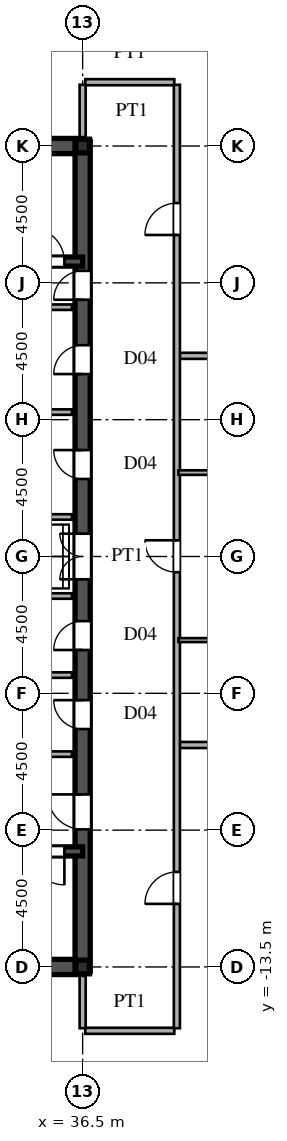
"""IFC4 building model, lengths in metres.
Left out: names, types, materials, properties, quantities, classifications, styles, units other than length and angle.
Written with IfcOpenShell. Run it as: python <this file> out.ifc"""

import sys

from ifc_helpers import new_model, si_unit, direction, frame, frame_2d, origin, origin_2d, place, context, subcontext, project, spatial, rectangle, i_section, extrude, source, transform, mapped, element, fill, save


model = new_model("IFC4")
c1 = context("Model", 3, precision=1e-05, world=origin(), true_north=direction((0.0, 1.0)))
c2 = subcontext(c1, "Body", "Model", "MODEL_VIEW")
j1 = project(units=[si_unit("LENGTHUNIT", "METRE"), si_unit("PLANEANGLEUNIT", "RADIAN")], contexts=[c1])
p1 = place(None, origin())
s1 = spatial("IfcSite", under=j1, at=p1, CompositionType="ELEMENT")
p2 = place(p1, origin())
s2 = spatial("IfcBuilding", under=s1, at=p2, CompositionType="ELEMENT")
p3 = place(p2, frame((0.0, 0.0, 239.4)))
s3 = spatial("IfcBuildingStorey", under=s2, at=p3, CompositionType="ELEMENT", Elevation=239.4)
m1 = source(origin(), c2, "Body", "SweptSolid", [
    extrude(i_section(OverallWidth=0.45, OverallDepth=0.45, WebThickness=0.016, FlangeThickness=0.025, at=origin_2d()), origin(), (0.0, 0.0, 1.0), 3.75),
])
for number, where, z_axis, x_axis in (
    (1, (36.5, -13.5, 0.0), (0.0, 0.0, 1.0), (1.0, 0.0, 0.0)),
    (2, (36.5, 13.5, 0.0), (0.0, 0.0, 1.0), (1.0, 0.0, 0.0)),
):
    element("IfcColumn", number, at=place(p3, frame(where, z_axis=z_axis, x_axis=x_axis)), inside=s3, PredefinedType="COLUMN", context=c2, shape_type="MappedRepresentation", body=[
        mapped(m1, transform((0.0, 0.0, 0.0), scale=1.0)),
    ])
for number, where, z_axis, x_axis in (
    (3, (27.5, -13.5, 0.0), (0.0, 0.0, 1.0), (1.0, 0.0, 0.0)),
    (4, (27.5, 13.5, 0.0), (0.0, 0.0, 1.0), (1.0, 0.0, 0.0)),
):
    element("IfcWall", number, at=place(p3, frame(where, z_axis=z_axis, x_axis=x_axis)), inside=s3, PredefinedType="SHEAR", context=c2, shape_type="SweptSolid", body=[
        extrude(rectangle(XDim=9.0, YDim=0.5, at=frame_2d((4.5, 0.0))), origin(), (0.0, 0.0, 1.0), 3.53),
    ])
p4 = place(p3, frame((36.5, -13.65, 0.0), z_axis=(0.0, 0.0, 1.0), x_axis=(0.0, 1.0, 0.0)))
e5 = element("IfcWall", 5, at=p4, inside=s3, PredefinedType="SHEAR", context=c2, shape_type="SweptSolid", body=[
    extrude(rectangle(XDim=7.15, YDim=0.5, at=frame_2d((3.575, 0.0))), origin(), (0.0, 0.0, 1.0), 3.53),
])
p5 = place(p4, frame((4.675, 0.0, 0.0)))
e6 = element("IfcOpeningElement", 6, at=p5, cuts=e5, PredefinedType="OPENING", context=c2, shape_type="SweptSolid", body=[
    extrude(rectangle(XDim=1.15, YDim=2.2, at=frame_2d((0.575, 1.1))), frame((0.0, 0.26, 0.0), z_axis=(0.0, -1.0, 0.0), x_axis=(1.0, 0.0, 0.0)), (0.0, 0.0, 1.0), 0.52),
])
p6 = place(p3, frame((36.5, -1.3, 0.0), z_axis=(0.0, 0.0, 1.0), x_axis=(0.0, 1.0, 0.0)))
e7 = element("IfcWall", 7, at=p6, inside=s3, PredefinedType="SHEAR", context=c2, shape_type="SweptSolid", body=[
    extrude(rectangle(XDim=2.6, YDim=0.5, at=frame_2d((1.3, 0.0))), origin(), (0.0, 0.0, 1.0), 3.53),
])
p7 = place(p6, frame((0.55, 0.0, 0.0)))
e8 = element("IfcOpeningElement", 8, at=p7, cuts=e7, PredefinedType="OPENING", context=c2, shape_type="SweptSolid", body=[
    extrude(rectangle(XDim=1.5, YDim=2.3, at=frame_2d((0.75, 1.15))), frame((0.0, 0.26, 0.0), z_axis=(0.0, -1.0, 0.0), x_axis=(1.0, 0.0, 0.0)), (0.0, 0.0, 1.0), 0.52),
])
p8 = place(p3, frame((36.5, 8.2, 0.0), z_axis=(0.0, 0.0, 1.0), x_axis=(0.0, 1.0, 0.0)))
e9 = element("IfcWall", 9, at=p8, inside=s3, PredefinedType="SHEAR", context=c2, shape_type="SweptSolid", body=[
    extrude(rectangle(XDim=5.45, YDim=0.5, at=frame_2d((2.725, 0.0))), origin(), (0.0, 0.0, 1.0), 3.53),
])
p9 = place(p8, frame((0.245, 0.0, 0.0)))
e10 = element("IfcOpeningElement", 10, at=p9, cuts=e9, PredefinedType="OPENING", context=c2, shape_type="SweptSolid", body=[
    extrude(rectangle(XDim=0.95, YDim=2.15, at=frame_2d((0.475, 1.075))), frame((0.0, 0.26, 0.0), z_axis=(0.0, -1.0, 0.0), x_axis=(1.0, 0.0, 0.0)), (0.0, 0.0, 1.0), 0.52),
])
p10 = place(p3, frame((36.5, -6.5, 0.0), z_axis=(0.0, 0.0, 1.0), x_axis=(0.0, 1.0, 0.0)))
e11 = element("IfcWall", 11, at=p10, inside=s3, PredefinedType="SHEAR", context=c2, shape_type="SweptSolid", body=[
    extrude(rectangle(XDim=2.6, YDim=0.5, at=frame_2d((1.3, 0.0))), origin(), (0.0, 0.0, 1.0), 3.53),
])
p11 = place(p10, frame((0.825, 0.0, 0.0)))
e12 = element("IfcOpeningElement", 12, at=p11, cuts=e11, PredefinedType="OPENING", context=c2, shape_type="SweptSolid", body=[
    extrude(rectangle(XDim=0.95, YDim=2.15, at=frame_2d((0.475, 1.075))), frame((0.0, 0.26, 0.0), z_axis=(0.0, -1.0, 0.0), x_axis=(1.0, 0.0, 0.0)), (0.0, 0.0, 1.0), 0.52),
])
p12 = place(p3, frame((36.5, -3.9, 0.0), z_axis=(0.0, 0.0, 1.0), x_axis=(0.0, 1.0, 0.0)))
e13 = element("IfcWall", 13, at=p12, inside=s3, PredefinedType="SHEAR", context=c2, shape_type="SweptSolid", body=[
    extrude(rectangle(XDim=2.6, YDim=0.5, at=frame_2d((1.3, 0.0))), origin(), (0.0, 0.0, 1.0), 3.53),
])
p13 = place(p12, frame((0.825, 0.0, 0.0)))
e14 = element("IfcOpeningElement", 14, at=p13, cuts=e13, PredefinedType="OPENING", context=c2, shape_type="SweptSolid", body=[
    extrude(rectangle(XDim=0.95, YDim=2.15, at=frame_2d((0.475, 1.075))), frame((0.0, 0.26, 0.0), z_axis=(0.0, -1.0, 0.0), x_axis=(1.0, 0.0, 0.0)), (0.0, 0.0, 1.0), 0.52),
])
p14 = place(p3, frame((36.5, 1.3, 0.0), z_axis=(0.0, 0.0, 1.0), x_axis=(0.0, 1.0, 0.0)))
e15 = element("IfcWall", 15, at=p14, inside=s3, PredefinedType="SHEAR", context=c2, shape_type="SweptSolid", body=[
    extrude(rectangle(XDim=3.45, YDim=0.5, at=frame_2d((1.725, 0.0))), origin(), (0.0, 0.0, 1.0), 3.53),
])
p15 = place(p14, frame((1.25, 0.0, 0.0)))
e16 = element("IfcOpeningElement", 16, at=p15, cuts=e15, PredefinedType="OPENING", context=c2, shape_type="SweptSolid", body=[
    extrude(rectangle(XDim=0.95, YDim=2.15, at=frame_2d((0.475, 1.075))), frame((0.0, 0.26, 0.0), z_axis=(0.0, -1.0, 0.0), x_axis=(1.0, 0.0, 0.0)), (0.0, 0.0, 1.0), 0.52),
])
p16 = place(p3, frame((36.5, 4.75, 0.0), z_axis=(0.0, 0.0, 1.0), x_axis=(0.0, 1.0, 0.0)))
e17 = element("IfcWall", 17, at=p16, inside=s3, PredefinedType="SHEAR", context=c2, shape_type="SweptSolid", body=[
    extrude(rectangle(XDim=3.45, YDim=0.5, at=frame_2d((1.725, 0.0))), origin(), (0.0, 0.0, 1.0), 3.53),
])
p17 = place(p16, frame((1.25, 0.0, 0.0)))
e18 = element("IfcOpeningElement", 18, at=p17, cuts=e17, PredefinedType="OPENING", context=c2, shape_type="SweptSolid", body=[
    extrude(rectangle(XDim=0.95, YDim=2.15, at=frame_2d((0.475, 1.075))), frame((0.0, 0.26, 0.0), z_axis=(0.0, -1.0, 0.0), x_axis=(1.0, 0.0, 0.0)), (0.0, 0.0, 1.0), 0.52),
])
p18 = place(p3, frame((27.5, -9.7, 0.0), z_axis=(0.0, 0.0, 1.0), x_axis=(1.0, 0.0, 0.0)))
e19 = element("IfcWall", 19, at=p18, inside=s3, PredefinedType="SHEAR", context=c2, shape_type="SweptSolid", body=[
    extrude(rectangle(XDim=9.0, YDim=0.3, at=frame_2d((4.5, 0.0))), origin(), (0.0, 0.0, 1.0), 3.53),
])
p19 = place(p18, frame((7.3, 0.0, 0.0)))
e20 = element("IfcOpeningElement", 20, at=p19, cuts=e19, PredefinedType="OPENING", context=c2, shape_type="SweptSolid", body=[
    extrude(rectangle(XDim=1.1, YDim=2.2, at=frame_2d((0.55, 1.1))), frame((0.0, 0.16, 0.0), z_axis=(0.0, -1.0, 0.0), x_axis=(1.0, 0.0, 0.0)), (0.0, 0.0, 1.0), 0.32),
])
p20 = place(p3, frame((27.5, 9.7, 0.0), z_axis=(0.0, 0.0, 1.0), x_axis=(1.0, 0.0, 0.0)))
e21 = element("IfcWall", 21, at=p20, inside=s3, PredefinedType="SHEAR", context=c2, shape_type="SweptSolid", body=[
    extrude(rectangle(XDim=9.0, YDim=0.3, at=frame_2d((4.5, 0.0))), origin(), (0.0, 0.0, 1.0), 3.53),
])
p21 = place(p20, frame((7.3, 0.0, 0.0)))
e22 = element("IfcOpeningElement", 22, at=p21, cuts=e21, PredefinedType="OPENING", context=c2, shape_type="SweptSolid", body=[
    extrude(rectangle(XDim=1.1, YDim=2.2, at=frame_2d((0.55, 1.1))), frame((0.0, 0.16, 0.0), z_axis=(0.0, -1.0, 0.0), x_axis=(1.0, 0.0, 0.0)), (0.0, 0.0, 1.0), 0.32),
])
for number, where, z_axis, x_axis in (
    (23, (30.45, -6.5, 0.0), (0.0, 0.0, 1.0), (1.0, 0.0, 0.0)),
    (24, (30.45, 8.2, 0.0), (0.0, 0.0, 1.0), (1.0, 0.0, 0.0)),
):
    element("IfcWall", number, at=place(p3, frame(where, z_axis=z_axis, x_axis=x_axis)), inside=s3, PredefinedType="PARTITIONING", context=c2, shape_type="SweptSolid", body=[
        extrude(rectangle(XDim=5.7, YDim=0.18, at=frame_2d((2.85, 0.0))), origin(), (0.0, 0.0, 1.0), 3.53),
    ])
for number, where, z_axis, x_axis in (
    (25, (33.2, -1.3, 0.0), (0.0, 0.0, 1.0), (1.0, 0.0, 0.0)),
    (26, (33.2, 1.3, 0.0), (0.0, 0.0, 1.0), (1.0, 0.0, 0.0)),
    (27, (33.2, -3.9, 0.0), (0.0, 0.0, 1.0), (1.0, 0.0, 0.0)),
    (28, (33.2, 4.75, 0.0), (0.0, 0.0, 1.0), (1.0, 0.0, 0.0)),
):
    element("IfcWall", number, at=place(p3, frame(where, z_axis=z_axis, x_axis=x_axis)), inside=s3, PredefinedType="PARTITIONING", context=c2, shape_type="SweptSolid", body=[
        extrude(rectangle(XDim=2.95, YDim=0.18, at=frame_2d((1.475, 0.0))), origin(), (0.0, 0.0, 1.0), 3.53),
    ])
p22 = place(p3, frame((36.585, -15.6, 0.0), z_axis=(0.0, 0.0, 1.0), x_axis=(1.0, 0.0, 0.0)))
e29 = element("IfcWall", 29, at=p22, inside=s3, PredefinedType="PARTITIONING", context=c2, shape_type="SweptSolid", body=[
    extrude(rectangle(XDim=2.93, YDim=0.2, at=frame_2d((1.465, 0.0))), origin(), (0.0, 0.0, 1.0), 3.53),
])
p23 = place(p3, frame((39.68, -6.2, 0.0), z_axis=(0.0, 0.0, 1.0), x_axis=(1.0, 0.0, 0.0)))
e30 = element("IfcWall", 30, at=p23, inside=s3, PredefinedType="PARTITIONING", context=c2, shape_type="SweptSolid", body=[
    extrude(rectangle(XDim=19.996, YDim=0.2, at=frame_2d((9.998, 0.0))), origin(), (0.0, 0.0, 1.0), 3.53),
])
p24 = place(p3, frame((39.65, -2.75, 0.0), z_axis=(0.0, 0.0, 1.0), x_axis=(1.0, 0.0, 0.0)))
e31 = element("IfcWall", 31, at=p24, inside=s3, PredefinedType="PARTITIONING", context=c2, shape_type="SweptSolid", body=[
    extrude(rectangle(XDim=4.4, YDim=0.13, at=frame_2d((2.2, 0.0))), origin(), (0.0, 0.0, 1.0), 3.53),
])
p25 = place(p24, frame((1.76, 0.0, 0.0)))
e32 = element("IfcOpeningElement", 32, at=p25, cuts=e31, PredefinedType="OPENING", context=c2, shape_type="SweptSolid", body=[
    extrude(rectangle(XDim=0.88, YDim=2.1, at=frame_2d((0.44, 1.05))), frame((0.0, 0.075, 0.0), z_axis=(0.0, -1.0, 0.0), x_axis=(1.0, 0.0, 0.0)), (0.0, 0.0, 1.0), 0.15),
])
p26 = place(p3, frame((39.65, 2.76, 0.0), z_axis=(0.0, 0.0, 1.0), x_axis=(1.0, 0.0, 0.0)))
e33 = element("IfcWall", 33, at=p26, inside=s3, PredefinedType="PARTITIONING", context=c2, shape_type="SweptSolid", body=[
    extrude(rectangle(XDim=4.4, YDim=0.15, at=frame_2d((2.2, 0.0))), origin(), (0.0, 0.0, 1.0), 3.53),
])
p27 = place(p26, frame((1.725, 0.0, 0.0)))
e34 = element("IfcOpeningElement", 34, at=p27, cuts=e33, PredefinedType="OPENING", context=c2, shape_type="SweptSolid", body=[
    extrude(rectangle(XDim=0.95, YDim=2.15, at=frame_2d((0.475, 1.075))), frame((0.0, 0.085, 0.0), z_axis=(0.0, -1.0, 0.0), x_axis=(1.0, 0.0, 0.0)), (0.0, 0.0, 1.0), 0.17),
])
p28 = place(p3, frame((39.68, 6.6, 0.0), z_axis=(0.0, 0.0, 1.0), x_axis=(1.0, 0.0, 0.0)))
e35 = element("IfcWall", 35, at=p28, inside=s3, PredefinedType="PARTITIONING", context=c2, shape_type="SweptSolid", body=[
    extrude(rectangle(XDim=19.33, YDim=0.2, at=frame_2d((9.665, 0.0))), origin(), (0.0, 0.0, 1.0), 3.53),
])
p29 = place(p3, frame((36.585, 15.6, 0.0), z_axis=(0.0, 0.0, 1.0), x_axis=(1.0, 0.0, 0.0)))
e36 = element("IfcWall", 36, at=p29, inside=s3, PredefinedType="PARTITIONING", context=c2, shape_type="SweptSolid", body=[
    extrude(rectangle(XDim=2.93, YDim=0.2, at=frame_2d((1.465, 0.0))), origin(), (0.0, 0.0, 1.0), 3.53),
])
for number, where, z_axis, x_axis in (
    (37, (36.5, -15.515, 0.0), (0.0, 0.0, 1.0), (0.0, 1.0, 0.0)),
    (38, (36.5, 13.755, 0.0), (0.0, 0.0, 1.0), (0.0, 1.0, 0.0)),
):
    element("IfcWall", number, at=place(p3, frame(where, z_axis=z_axis, x_axis=x_axis)), inside=s3, PredefinedType="PARTITIONING", context=c2, shape_type="SweptSolid", body=[
        extrude(rectangle(XDim=1.76, YDim=0.2, at=frame_2d((0.88, 0.0))), origin(), (0.0, 0.0, 1.0), 2.93),
    ])
p30 = place(p3, frame((39.6, -15.515, 0.0), z_axis=(0.0, 0.0, 1.0), x_axis=(0.0, 1.0, 0.0)))
e39 = element("IfcWall", 39, at=p30, inside=s3, PredefinedType="PARTITIONING", context=c2, shape_type="SweptSolid", body=[
    extrude(rectangle(XDim=31.03, YDim=0.2, at=frame_2d((15.515, 0.0))), origin(), (0.0, 0.0, 1.0), 3.53),
])
p31 = place(p30, frame((4.09, 0.0, 0.0)))
e40 = element("IfcOpeningElement", 40, at=p31, cuts=e39, PredefinedType="OPENING", context=c2, shape_type="SweptSolid", body=[
    extrude(rectangle(XDim=1.05, YDim=2.25, at=frame_2d((0.525, 1.125))), frame((0.0, 0.11, 0.0), z_axis=(0.0, -1.0, 0.0), x_axis=(1.0, 0.0, 0.0)), (0.0, 0.0, 1.0), 0.22),
])
p32 = place(p30, frame((14.998, 0.0, 0.0)))
e41 = element("IfcOpeningElement", 41, at=p32, cuts=e39, PredefinedType="OPENING", context=c2, shape_type="SweptSolid", body=[
    extrude(rectangle(XDim=1.05, YDim=2.25, at=frame_2d((0.525, 1.125))), frame((0.0, 0.11, 0.0), z_axis=(0.0, -1.0, 0.0), x_axis=(1.0, 0.0, 0.0)), (0.0, 0.0, 1.0), 0.22),
])
p33 = place(p30, frame((26.09, 0.0, 0.0)))
e42 = element("IfcOpeningElement", 42, at=p33, cuts=e39, PredefinedType="OPENING", context=c2, shape_type="SweptSolid", body=[
    extrude(rectangle(XDim=1.05, YDim=2.25, at=frame_2d((0.525, 1.125))), frame((0.0, 0.11, 0.0), z_axis=(0.0, -1.0, 0.0), x_axis=(1.0, 0.0, 0.0)), (0.0, 0.0, 1.0), 0.22),
])
m2 = source(origin(), c2, "Body", "SweptSolid", [
    extrude(rectangle(XDim=1.15, YDim=2.2, at=frame_2d((0.575, 1.1))), frame((0.0, 0.025, 0.0), z_axis=(0.0, -1.0, 0.0), x_axis=(1.0, 0.0, 0.0)), (0.0, 0.0, 1.0), 0.05),
])
p34 = place(p5, origin())
e43 = element("IfcDoor", 43, at=p34, inside=s3, OperationType="SINGLE_SWING_RIGHT", PredefinedType="DOOR", context=c2, shape_type="MappedRepresentation", body=[
    mapped(m2, transform((0.0, 0.0, 0.0), scale=1.0)),
])
fill(e6, e43)
m3 = source(origin(), c2, "Body", "SweptSolid", [
    extrude(rectangle(XDim=1.5, YDim=2.3, at=frame_2d((0.75, 1.15))), frame((0.0, 0.025, 0.0), z_axis=(0.0, -1.0, 0.0), x_axis=(1.0, 0.0, 0.0)), (0.0, 0.0, 1.0), 0.05),
])
p35 = place(p7, origin())
e44 = element("IfcDoor", 44, at=p35, inside=s3, OperationType="DOUBLE_SWING_LEFT", PredefinedType="DOOR", context=c2, shape_type="MappedRepresentation", body=[
    mapped(m3, transform((0.0, 0.0, 0.0), scale=1.0)),
])
fill(e8, e44)
m4 = source(origin(), c2, "Body", "SweptSolid", [
    extrude(rectangle(XDim=0.95, YDim=2.15, at=frame_2d((0.475, 1.075))), frame((0.0, 0.025, 0.0), z_axis=(0.0, -1.0, 0.0), x_axis=(1.0, 0.0, 0.0)), (0.0, 0.0, 1.0), 0.05),
])
p36 = place(p9, origin())
e45 = element("IfcDoor", 45, at=p36, inside=s3, OperationType="SINGLE_SWING_LEFT", PredefinedType="DOOR", context=c2, shape_type="MappedRepresentation", body=[
    mapped(m4, transform((0.0, 0.0, 0.0), scale=1.0)),
])
fill(e10, e45)
p37 = place(p11, origin())
e46 = element("IfcDoor", 46, at=p37, inside=s3, OperationType="SINGLE_SWING_RIGHT", PredefinedType="DOOR", context=c2, shape_type="MappedRepresentation", body=[
    mapped(m4, transform((0.0, 0.0, 0.0), scale=1.0)),
])
fill(e12, e46)
p38 = place(p13, origin())
e47 = element("IfcDoor", 47, at=p38, inside=s3, OperationType="SINGLE_SWING_LEFT", PredefinedType="DOOR", context=c2, shape_type="MappedRepresentation", body=[
    mapped(m4, transform((0.0, 0.0, 0.0), scale=1.0)),
])
fill(e14, e47)
p39 = place(p15, origin())
e48 = element("IfcDoor", 48, at=p39, inside=s3, OperationType="SINGLE_SWING_RIGHT", PredefinedType="DOOR", context=c2, shape_type="MappedRepresentation", body=[
    mapped(m4, transform((0.0, 0.0, 0.0), scale=1.0)),
])
fill(e16, e48)
p40 = place(p17, origin())
e49 = element("IfcDoor", 49, at=p40, inside=s3, OperationType="SINGLE_SWING_LEFT", PredefinedType="DOOR", context=c2, shape_type="MappedRepresentation", body=[
    mapped(m4, transform((0.0, 0.0, 0.0), scale=1.0)),
])
fill(e18, e49)
m5 = source(origin(), c2, "Body", "SweptSolid", [
    extrude(rectangle(XDim=1.1, YDim=2.2, at=frame_2d((0.55, 1.1))), frame((0.0, 0.025, 0.0), z_axis=(0.0, -1.0, 0.0), x_axis=(1.0, 0.0, 0.0)), (0.0, 0.0, 1.0), 0.05),
])
p41 = place(p19, frame((1.1, 0.0, 0.0), z_axis=(0.0, 0.0, 1.0), x_axis=(-1.0, 0.0, 0.0)))
e50 = element("IfcDoor", 50, at=p41, inside=s3, OperationType="SINGLE_SWING_RIGHT", PredefinedType="DOOR", context=c2, shape_type="MappedRepresentation", body=[
    mapped(m5, transform((0.0, 0.0, 0.0), scale=1.0)),
])
fill(e20, e50)
p42 = place(p21, origin())
e51 = element("IfcDoor", 51, at=p42, inside=s3, OperationType="SINGLE_SWING_LEFT", PredefinedType="DOOR", context=c2, shape_type="MappedRepresentation", body=[
    mapped(m5, transform((0.0, 0.0, 0.0), scale=1.0)),
])
fill(e22, e51)
m6 = source(origin(), c2, "Body", "SweptSolid", [
    extrude(rectangle(XDim=1.05, YDim=2.25, at=frame_2d((0.525, 1.125))), frame((0.0, 0.025, 0.0), z_axis=(0.0, -1.0, 0.0), x_axis=(1.0, 0.0, 0.0)), (0.0, 0.0, 1.0), 0.05),
])
p43 = place(p31, origin())
e52 = element("IfcDoor", 52, at=p43, inside=s3, OperationType="SINGLE_SWING_LEFT", PredefinedType="DOOR", context=c2, shape_type="MappedRepresentation", body=[
    mapped(m6, transform((0.0, 0.0, 0.0), scale=1.0)),
])
fill(e40, e52)
p44 = place(p32, origin())
e53 = element("IfcDoor", 53, at=p44, inside=s3, OperationType="SINGLE_SWING_RIGHT", PredefinedType="DOOR", context=c2, shape_type="MappedRepresentation", body=[
    mapped(m6, transform((0.0, 0.0, 0.0), scale=1.0)),
])
fill(e41, e53)
p45 = place(p33, origin())
e54 = element("IfcDoor", 54, at=p45, inside=s3, OperationType="SINGLE_SWING_LEFT", PredefinedType="DOOR", context=c2, shape_type="MappedRepresentation", body=[
    mapped(m6, transform((0.0, 0.0, 0.0), scale=1.0)),
])
fill(e42, e54)
save(model, sys.argv[1])
